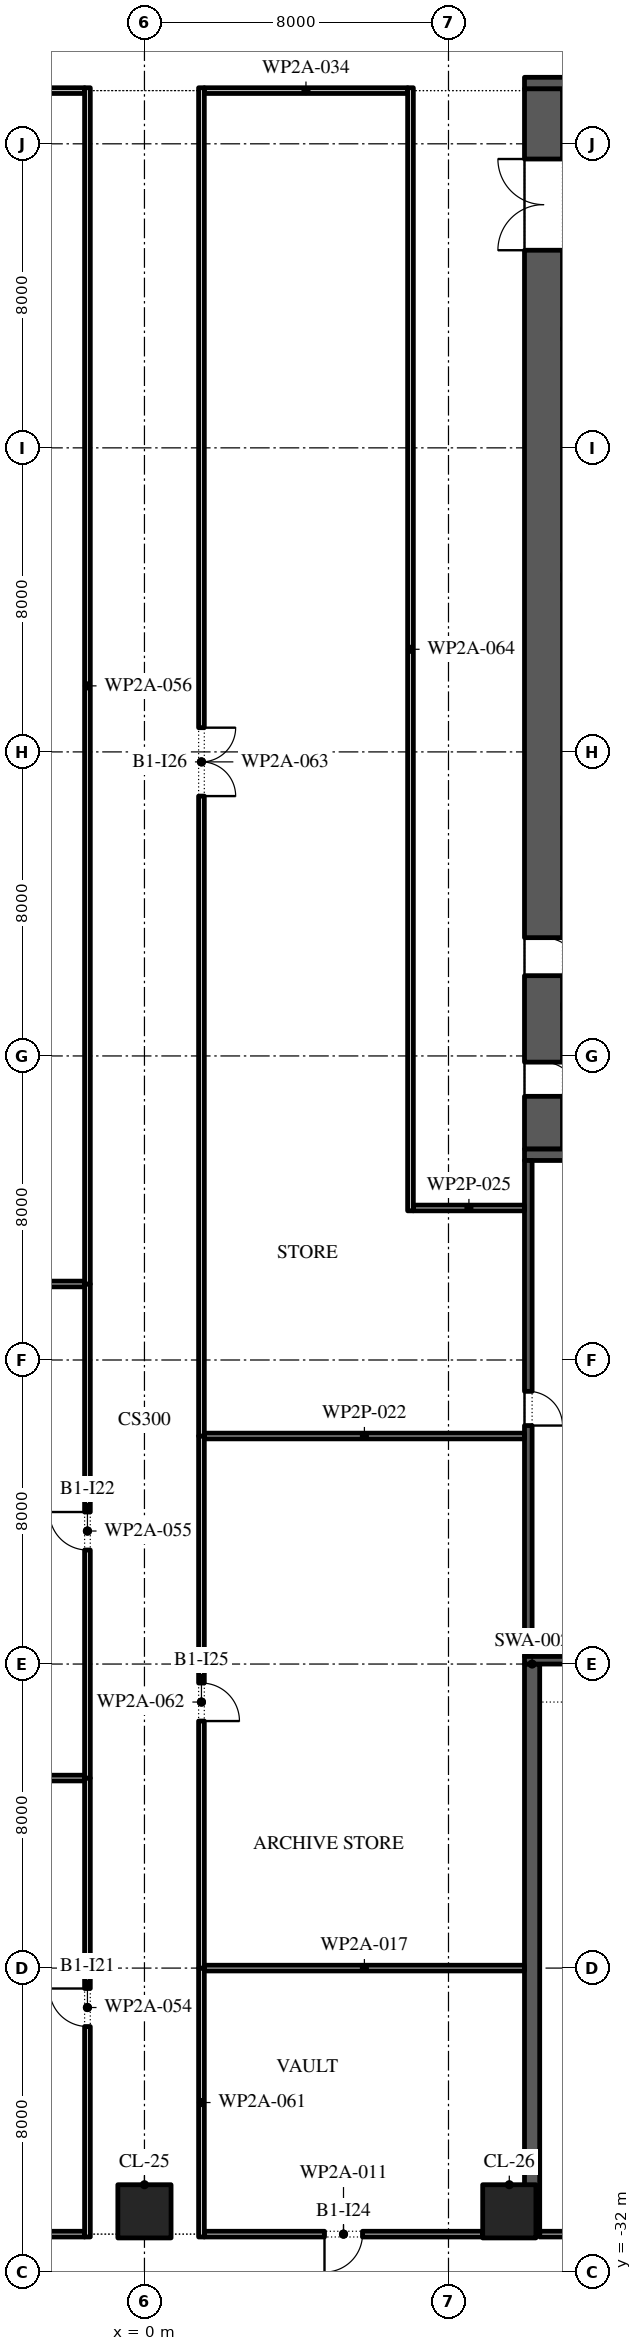
"""IFC4 building model, lengths in metres.
Left out: names, types, materials, properties, quantities, classifications, styles, units other than length and angle.
Written with IfcOpenShell. Run it as: python <this file> out.ifc"""

import sys

from ifc_helpers import new_model, si_unit, direction, frame, frame_2d, origin, origin_2d, place, context, subcontext, project, spatial, rectangle, extrude, element, fill, save


model = new_model("IFC4")
c1 = context("Model", 3, precision=1e-05, world=origin(), true_north=direction((0.0, 1.0)))
c2 = subcontext(c1, "Body", "Model", "MODEL_VIEW")
j1 = project(units=[si_unit("LENGTHUNIT", "METRE"), si_unit("PLANEANGLEUNIT", "RADIAN")], contexts=[c1])
p1 = place(None, origin())
s1 = spatial("IfcSite", under=j1, at=p1, CompositionType="ELEMENT")
p2 = place(p1, origin())
s2 = spatial("IfcBuilding", under=s1, at=p2, CompositionType="ELEMENT")
p3 = place(p2, frame((0.0, 0.0, -5.2)))
s3 = spatial("IfcBuildingStorey", under=s2, at=p3, CompositionType="ELEMENT", Elevation=-5.2)
for number, where, z_axis, x_axis in (
    (1, (0.0, -30.4, 0.0), (0.0, 0.0, 1.0), (1.0, 0.0, 0.0)),
    (2, (9.6, -30.4, 0.0), (0.0, 0.0, 1.0), (1.0, 0.0, 0.0)),
):
    element("IfcColumn", number, at=place(p3, frame(where, z_axis=z_axis, x_axis=x_axis)), inside=s3, PredefinedType="COLUMN", context=c2, shape_type="SweptSolid", body=[
        extrude(rectangle(XDim=1.4, YDim=1.4, at=origin_2d()), origin(), (0.0, 0.0, 1.0), 5.2),
    ])
p4 = place(p3, frame((10.2, -31.0, 0.0), z_axis=(0.0, 0.0, 1.0), x_axis=(0.0, 1.0, 0.0)))
e3 = element("IfcWall", 3, at=p4, inside=s3, PredefinedType="SHEAR", context=c2, shape_type="SweptSolid", body=[
    extrude(rectangle(XDim=15.0, YDim=0.4, at=frame_2d((7.5, 0.0))), origin(), (0.0, 0.0, 1.0), 4.9),
])
p5 = place(p3, frame((10.5, -2.45, 0.0), z_axis=(0.0, 0.0, 1.0), x_axis=(0.0, 1.0, 0.0)))
e4 = element("IfcWall", 4, at=p5, inside=s3, PredefinedType="SHEAR", context=c2, shape_type="SweptSolid", body=[
    extrude(rectangle(XDim=27.9, YDim=1.0, at=frame_2d((13.95, 0.0))), origin(), (0.0, 0.0, 1.0), 4.9),
])
p6 = place(p5, frame((23.65, 0.0, 0.0)))
e5 = element("IfcOpeningElement", 5, at=p6, cuts=e4, PredefinedType="OPENING", context=c2, shape_type="SweptSolid", body=[
    extrude(rectangle(XDim=2.4, YDim=2.1, at=frame_2d((1.2, 1.05))), frame((0.0, 0.51, 0.0), z_axis=(0.0, -1.0, 0.0), x_axis=(1.0, 0.0, 0.0)), (0.0, 0.0, 1.0), 1.02),
])
p7 = place(p5, frame((1.387, 0.0, 0.0)))
e6 = element("IfcOpeningElement", 6, at=p7, cuts=e4, PredefinedType="OPENING", context=c2, shape_type="SweptSolid", body=[
    extrude(rectangle(XDim=0.9, YDim=2.1, at=frame_2d((0.45, 1.05))), frame((0.0, 0.51, 0.0), z_axis=(0.0, -1.0, 0.0), x_axis=(1.0, 0.0, 0.0)), (0.0, 0.0, 1.0), 1.02),
])
p8 = place(p5, frame((4.562, 0.0, 0.0)))
e7 = element("IfcOpeningElement", 7, at=p8, cuts=e4, PredefinedType="OPENING", context=c2, shape_type="SweptSolid", body=[
    extrude(rectangle(XDim=1.0, YDim=2.1, at=frame_2d((0.5, 1.05))), frame((0.0, 0.51, 0.0), z_axis=(0.0, -1.0, 0.0), x_axis=(1.0, 0.0, 0.0)), (0.0, 0.0, 1.0), 1.02),
])
for number, where, z_axis, x_axis in (
    (8, (10.0, -2.6, 0.0), (0.0, 0.0, 1.0), (1.0, 0.0, 0.0)),
    (9, (10.0, 25.6, 0.0), (0.0, 0.0, 1.0), (1.0, 0.0, 0.0)),
):
    element("IfcWall", number, at=place(p3, frame(where, z_axis=z_axis, x_axis=x_axis)), inside=s3, PredefinedType="SHEAR", context=c2, shape_type="SweptSolid", body=[
        extrude(rectangle(XDim=12.0, YDim=0.3, at=frame_2d((6.0, 0.0))), origin(), (0.0, 0.0, 1.0), 4.9),
    ])
p9 = place(p3, frame((10.1, -15.8, 0.0), z_axis=(0.0, 0.0, 1.0), x_axis=(0.0, 1.0, 0.0)))
e10 = element("IfcWall", 10, at=p9, inside=s3, PredefinedType="SHEAR", context=c2, shape_type="SweptSolid", body=[
    extrude(rectangle(XDim=13.05, YDim=0.2, at=frame_2d((6.525, 0.0))), origin(), (0.0, 0.0, 1.0), 4.9),
])
p10 = place(p9, frame((6.075, 0.0, 0.0)))
e11 = element("IfcOpeningElement", 11, at=p10, cuts=e10, PredefinedType="OPENING", context=c2, shape_type="SweptSolid", body=[
    extrude(rectangle(XDim=0.9, YDim=2.1, at=frame_2d((0.45, 1.05))), frame((0.0, 0.11, 0.0), z_axis=(0.0, -1.0, 0.0), x_axis=(1.0, 0.0, 0.0)), (0.0, 0.0, 1.0), 0.22),
])
p11 = place(p3, frame((10.0, -15.9, 0.0), z_axis=(0.0, 0.0, 1.0), x_axis=(1.0, 0.0, 0.0)))
e12 = element("IfcWall", 12, at=p11, inside=s3, PredefinedType="SHEAR", context=c2, shape_type="SweptSolid", body=[
    extrude(rectangle(XDim=12.0, YDim=0.2, at=frame_2d((6.0, 0.0))), origin(), (0.0, 0.0, 1.0), 4.9),
])
p12 = place(p3, frame((-8.9, -31.0, 0.0), z_axis=(0.0, 0.0, 1.0), x_axis=(1.0, 0.0, 0.0)))
e13 = element("IfcWall", 13, at=p12, inside=s3, PredefinedType="PARTITIONING", context=c2, shape_type="SweptSolid", body=[
    extrude(rectangle(XDim=7.325, YDim=0.15, at=frame_2d((3.663, 0.0))), origin(), (0.0, 0.0, 1.0), 4.9),
])
p13 = place(p3, frame((1.575, -31.0, 0.0), z_axis=(0.0, 0.0, 1.0), x_axis=(1.0, 0.0, 0.0)))
e14 = element("IfcWall", 14, at=p13, inside=s3, PredefinedType="PARTITIONING", context=c2, shape_type="SweptSolid", body=[
    extrude(rectangle(XDim=7.325, YDim=0.15, at=frame_2d((3.663, 0.0))), origin(), (0.0, 0.0, 1.0), 4.9),
])
p14 = place(p13, frame((3.163, 0.0, 0.0)))
e15 = element("IfcOpeningElement", 15, at=p14, cuts=e14, PredefinedType="OPENING", context=c2, shape_type="SweptSolid", body=[
    extrude(rectangle(XDim=1.0, YDim=2.1, at=frame_2d((0.5, 1.05))), frame((0.0, 0.085, 0.0), z_axis=(0.0, -1.0, 0.0), x_axis=(1.0, 0.0, 0.0)), (0.0, 0.0, 1.0), 0.17),
])
p15 = place(p3, frame((10.4, -31.0, 0.0), z_axis=(0.0, 0.0, 1.0), x_axis=(1.0, 0.0, 0.0)))
e16 = element("IfcWall", 16, at=p15, inside=s3, PredefinedType="PARTITIONING", context=c2, shape_type="SweptSolid", body=[
    extrude(rectangle(XDim=8.1, YDim=0.15, at=frame_2d((4.05, 0.0))), origin(), (0.0, 0.0, 1.0), 4.9),
])
for number, where, z_axis, x_axis in (
    (17, (1.575, -24.0, 0.0), (0.0, 0.0, 1.0), (1.0, 0.0, 0.0)),
    (18, (-10.0, -19.0, 0.0), (0.0, 0.0, 1.0), (1.0, 0.0, 0.0)),
):
    element("IfcWall", number, at=place(p3, frame(where, z_axis=z_axis, x_axis=x_axis)), inside=s3, PredefinedType="PARTITIONING", context=c2, shape_type="SweptSolid", body=[
        extrude(rectangle(XDim=8.425, YDim=0.15, at=frame_2d((4.212, 0.0))), origin(), (0.0, 0.0, 1.0), 4.9),
    ])
p16 = place(p3, frame((1.575, -10.0, 0.0), z_axis=(0.0, 0.0, 1.0), x_axis=(1.0, 0.0, 0.0)))
e19 = element("IfcWall", 19, at=p16, inside=s3, PredefinedType="PARTITIONING", context=c2, shape_type="SweptSolid", body=[
    extrude(rectangle(XDim=8.425, YDim=0.15, at=frame_2d((4.212, 0.0))), origin(), (0.0, 0.0, 1.0), 3.93),
])
p17 = place(p3, frame((-10.0, -6.0, 0.0), z_axis=(0.0, 0.0, 1.0), x_axis=(1.0, 0.0, 0.0)))
e20 = element("IfcWall", 20, at=p17, inside=s3, PredefinedType="PARTITIONING", context=c2, shape_type="SweptSolid", body=[
    extrude(rectangle(XDim=8.425, YDim=0.15, at=frame_2d((4.212, 0.0))), origin(), (0.0, 0.0, 1.0), 4.9),
])
p18 = place(p3, frame((7.075, -4.0, 0.0), z_axis=(0.0, 0.0, 1.0), x_axis=(1.0, 0.0, 0.0)))
e21 = element("IfcWall", 21, at=p18, inside=s3, PredefinedType="PARTITIONING", context=c2, shape_type="SweptSolid", body=[
    extrude(rectangle(XDim=2.925, YDim=0.15, at=frame_2d((1.462, 0.0))), origin(), (0.0, 0.0, 1.0), 3.93),
])
for number, where, z_axis, x_axis in (
    (22, (-6.925, 25.4, 0.0), (0.0, 0.0, 1.0), (1.0, 0.0, 0.0)),
    (23, (1.575, 25.4, 0.0), (0.0, 0.0, 1.0), (1.0, 0.0, 0.0)),
):
    element("IfcWall", number, at=place(p3, frame(where, z_axis=z_axis, x_axis=x_axis)), inside=s3, PredefinedType="PARTITIONING", context=c2, shape_type="SweptSolid", body=[
        extrude(rectangle(XDim=5.35, YDim=0.15, at=frame_2d((2.675, 0.0))), origin(), (0.0, 0.0, 1.0), 4.9),
    ])
p19 = place(p3, frame((-1.5, -31.075, 0.0), z_axis=(0.0, 0.0, 1.0), x_axis=(0.0, 1.0, 0.0)))
e24 = element("IfcWall", 24, at=p19, inside=s3, PredefinedType="PARTITIONING", context=c2, shape_type="SweptSolid", body=[
    extrude(rectangle(XDim=12.075, YDim=0.15, at=frame_2d((6.038, 0.0))), origin(), (0.0, 0.0, 1.0), 4.9),
])
p20 = place(p19, frame((5.538, 0.0, 0.0)))
e25 = element("IfcOpeningElement", 25, at=p20, cuts=e24, PredefinedType="OPENING", context=c2, shape_type="SweptSolid", body=[
    extrude(rectangle(XDim=1.0, YDim=2.1, at=frame_2d((0.5, 1.05))), frame((0.0, 0.085, 0.0), z_axis=(0.0, -1.0, 0.0), x_axis=(1.0, 0.0, 0.0)), (0.0, 0.0, 1.0), 0.17),
])
p21 = place(p3, frame((-1.5, -19.0, 0.0), z_axis=(0.0, 0.0, 1.0), x_axis=(0.0, 1.0, 0.0)))
e26 = element("IfcWall", 26, at=p21, inside=s3, PredefinedType="PARTITIONING", context=c2, shape_type="SweptSolid", body=[
    extrude(rectangle(XDim=13.0, YDim=0.15, at=frame_2d((6.5, 0.0))), origin(), (0.0, 0.0, 1.0), 4.9),
])
p22 = place(p21, frame((6.0, 0.0, 0.0)))
e27 = element("IfcOpeningElement", 27, at=p22, cuts=e26, PredefinedType="OPENING", context=c2, shape_type="SweptSolid", body=[
    extrude(rectangle(XDim=1.0, YDim=2.1, at=frame_2d((0.5, 1.05))), frame((0.0, 0.085, 0.0), z_axis=(0.0, -1.0, 0.0), x_axis=(1.0, 0.0, 0.0)), (0.0, 0.0, 1.0), 0.17),
])
p23 = place(p3, frame((-1.5, -6.0, 0.0), z_axis=(0.0, 0.0, 1.0), x_axis=(0.0, 1.0, 0.0)))
e28 = element("IfcWall", 28, at=p23, inside=s3, PredefinedType="PARTITIONING", context=c2, shape_type="SweptSolid", body=[
    extrude(rectangle(XDim=31.475, YDim=0.15, at=frame_2d((15.738, 0.0))), origin(), (0.0, 0.0, 1.0), 4.9),
])
p24 = place(p3, frame((1.5, -31.075, 0.0), z_axis=(0.0, 0.0, 1.0), x_axis=(0.0, 1.0, 0.0)))
e29 = element("IfcWall", 29, at=p24, inside=s3, PredefinedType="PARTITIONING", context=c2, shape_type="SweptSolid", body=[
    extrude(rectangle(XDim=7.075, YDim=0.15, at=frame_2d((3.538, 0.0))), origin(), (0.0, 0.0, 1.0), 4.9),
])
p25 = place(p3, frame((1.5, -24.0, 0.0), z_axis=(0.0, 0.0, 1.0), x_axis=(0.0, 1.0, 0.0)))
e30 = element("IfcWall", 30, at=p25, inside=s3, PredefinedType="PARTITIONING", context=c2, shape_type="SweptSolid", body=[
    extrude(rectangle(XDim=14.0, YDim=0.15, at=frame_2d((7.0, 0.0))), origin(), (0.0, 0.0, 1.0), 4.9),
])
p26 = place(p25, frame((6.5, 0.0, 0.0)))
e31 = element("IfcOpeningElement", 31, at=p26, cuts=e30, PredefinedType="OPENING", context=c2, shape_type="SweptSolid", body=[
    extrude(rectangle(XDim=1.0, YDim=2.1, at=frame_2d((0.5, 1.05))), frame((0.0, 0.085, 0.0), z_axis=(0.0, -1.0, 0.0), x_axis=(1.0, 0.0, 0.0)), (0.0, 0.0, 1.0), 0.17),
])
p27 = place(p3, frame((1.5, -10.0, 0.0), z_axis=(0.0, 0.0, 1.0), x_axis=(0.0, 1.0, 0.0)))
e32 = element("IfcWall", 32, at=p27, inside=s3, PredefinedType="PARTITIONING", context=c2, shape_type="SweptSolid", body=[
    extrude(rectangle(XDim=35.475, YDim=0.15, at=frame_2d((17.738, 0.0))), origin(), (0.0, 0.0, 1.0), 4.9),
])
p28 = place(p27, frame((16.837, 0.0, 0.0)))
e33 = element("IfcOpeningElement", 33, at=p28, cuts=e32, PredefinedType="OPENING", context=c2, shape_type="SweptSolid", body=[
    extrude(rectangle(XDim=1.8, YDim=2.1, at=frame_2d((0.9, 1.05))), frame((0.0, 0.085, 0.0), z_axis=(0.0, -1.0, 0.0), x_axis=(1.0, 0.0, 0.0)), (0.0, 0.0, 1.0), 0.17),
])
p29 = place(p3, frame((7.0, -4.075, 0.0), z_axis=(0.0, 0.0, 1.0), x_axis=(0.0, 1.0, 0.0)))
e34 = element("IfcWall", 34, at=p29, inside=s3, PredefinedType="PARTITIONING", context=c2, shape_type="SweptSolid", body=[
    extrude(rectangle(XDim=29.55, YDim=0.15, at=frame_2d((14.775, 0.0))), origin(), (0.0, 0.0, 1.0), 4.9),
])
p30 = place(p6, origin())
e35 = element("IfcDoor", 35, at=p30, inside=s3, OperationType="DOUBLE_DOOR_SINGLE_SWING", PredefinedType="DOOR", context=c2, shape_type="SweptSolid", body=[
    extrude(rectangle(XDim=2.4, YDim=2.1, at=frame_2d((1.2, 1.05))), frame((0.0, 0.025, 0.0), z_axis=(0.0, -1.0, 0.0), x_axis=(1.0, 0.0, 0.0)), (0.0, 0.0, 1.0), 0.05),
])
fill(e5, e35)
p31 = place(p7, frame((0.9, -0.95, 0.0), z_axis=(0.0, 0.0, 1.0), x_axis=(-1.0, 0.0, 0.0)))
e36 = element("IfcDoor", 36, at=p31, inside=s3, OperationType="SINGLE_SWING_LEFT", PredefinedType="DOOR", context=c2, shape_type="SweptSolid", body=[
    extrude(rectangle(XDim=0.9, YDim=2.1, at=frame_2d((0.45, 1.05))), frame((0.0, -0.45, 0.0), z_axis=(0.0, -1.0, 0.0), x_axis=(1.0, 0.0, 0.0)), (0.0, 0.0, 1.0), 0.05),
])
fill(e6, e36)
p32 = place(p8, frame((1.0, -0.95, 0.0), z_axis=(0.0, 0.0, 1.0), x_axis=(-1.0, 0.0, 0.0)))
e37 = element("IfcDoor", 37, at=p32, inside=s3, OperationType="SINGLE_SWING_LEFT", PredefinedType="DOOR", context=c2, shape_type="SweptSolid", body=[
    extrude(rectangle(XDim=1.0, YDim=2.1, at=frame_2d((0.5, 1.05))), frame((0.0, -0.45, 0.0), z_axis=(0.0, -1.0, 0.0), x_axis=(1.0, 0.0, 0.0)), (0.0, 0.0, 1.0), 0.05),
])
fill(e7, e37)
p33 = place(p10, frame((0.9, -0.15, 0.0), z_axis=(0.0, 0.0, 1.0), x_axis=(-1.0, 0.0, 0.0)))
e38 = element("IfcDoor", 38, at=p33, inside=s3, OperationType="SINGLE_SWING_LEFT", PredefinedType="DOOR", context=c2, shape_type="SweptSolid", body=[
    extrude(rectangle(XDim=0.9, YDim=2.1, at=frame_2d((0.45, 1.05))), frame((0.0, -0.05, 0.0), z_axis=(0.0, -1.0, 0.0), x_axis=(1.0, 0.0, 0.0)), (0.0, 0.0, 1.0), 0.05),
])
fill(e11, e38)
p34 = place(p20, origin())
e39 = element("IfcDoor", 39, at=p34, inside=s3, OperationType="SINGLE_SWING_LEFT", PredefinedType="DOOR", context=c2, shape_type="SweptSolid", body=[
    extrude(rectangle(XDim=1.0, YDim=2.1, at=frame_2d((0.5, 1.05))), frame((0.0, 0.025, 0.0), z_axis=(0.0, -1.0, 0.0), x_axis=(1.0, 0.0, 0.0)), (0.0, 0.0, 1.0), 0.05),
])
fill(e25, e39)
p35 = place(p22, origin())
e40 = element("IfcDoor", 40, at=p35, inside=s3, OperationType="SINGLE_SWING_LEFT", PredefinedType="DOOR", context=c2, shape_type="SweptSolid", body=[
    extrude(rectangle(XDim=1.0, YDim=2.1, at=frame_2d((0.5, 1.05))), frame((0.0, 0.025, 0.0), z_axis=(0.0, -1.0, 0.0), x_axis=(1.0, 0.0, 0.0)), (0.0, 0.0, 1.0), 0.05),
])
fill(e27, e40)
p36 = place(p14, frame((1.0, 0.0, 0.0), z_axis=(0.0, 0.0, 1.0), x_axis=(-1.0, 0.0, 0.0)))
e41 = element("IfcDoor", 41, at=p36, inside=s3, OperationType="SINGLE_SWING_LEFT", PredefinedType="DOOR", context=c2, shape_type="SweptSolid", body=[
    extrude(rectangle(XDim=1.0, YDim=2.1, at=frame_2d((0.5, 1.05))), frame((0.0, 0.025, 0.0), z_axis=(0.0, -1.0, 0.0), x_axis=(1.0, 0.0, 0.0)), (0.0, 0.0, 1.0), 0.05),
])
fill(e15, e41)
p37 = place(p26, frame((1.0, 0.0, 0.0), z_axis=(0.0, 0.0, 1.0), x_axis=(-1.0, 0.0, 0.0)))
e42 = element("IfcDoor", 42, at=p37, inside=s3, OperationType="SINGLE_SWING_LEFT", PredefinedType="DOOR", context=c2, shape_type="SweptSolid", body=[
    extrude(rectangle(XDim=1.0, YDim=2.1, at=frame_2d((0.5, 1.05))), frame((0.0, 0.025, 0.0), z_axis=(0.0, -1.0, 0.0), x_axis=(1.0, 0.0, 0.0)), (0.0, 0.0, 1.0), 0.05),
])
fill(e31, e42)
p38 = place(p28, frame((1.8, 0.0, 0.0), z_axis=(0.0, 0.0, 1.0), x_axis=(-1.0, 0.0, 0.0)))
e43 = element("IfcDoor", 43, at=p38, inside=s3, OperationType="SINGLE_SWING_LEFT", PredefinedType="DOOR", context=c2, shape_type="SweptSolid", body=[
    extrude(rectangle(XDim=1.8, YDim=2.1, at=frame_2d((0.9, 1.05))), frame((0.0, 0.025, 0.0), z_axis=(0.0, -1.0, 0.0), x_axis=(1.0, 0.0, 0.0)), (0.0, 0.0, 1.0), 0.05),
])
fill(e33, e43)
save(model, sys.argv[1])
